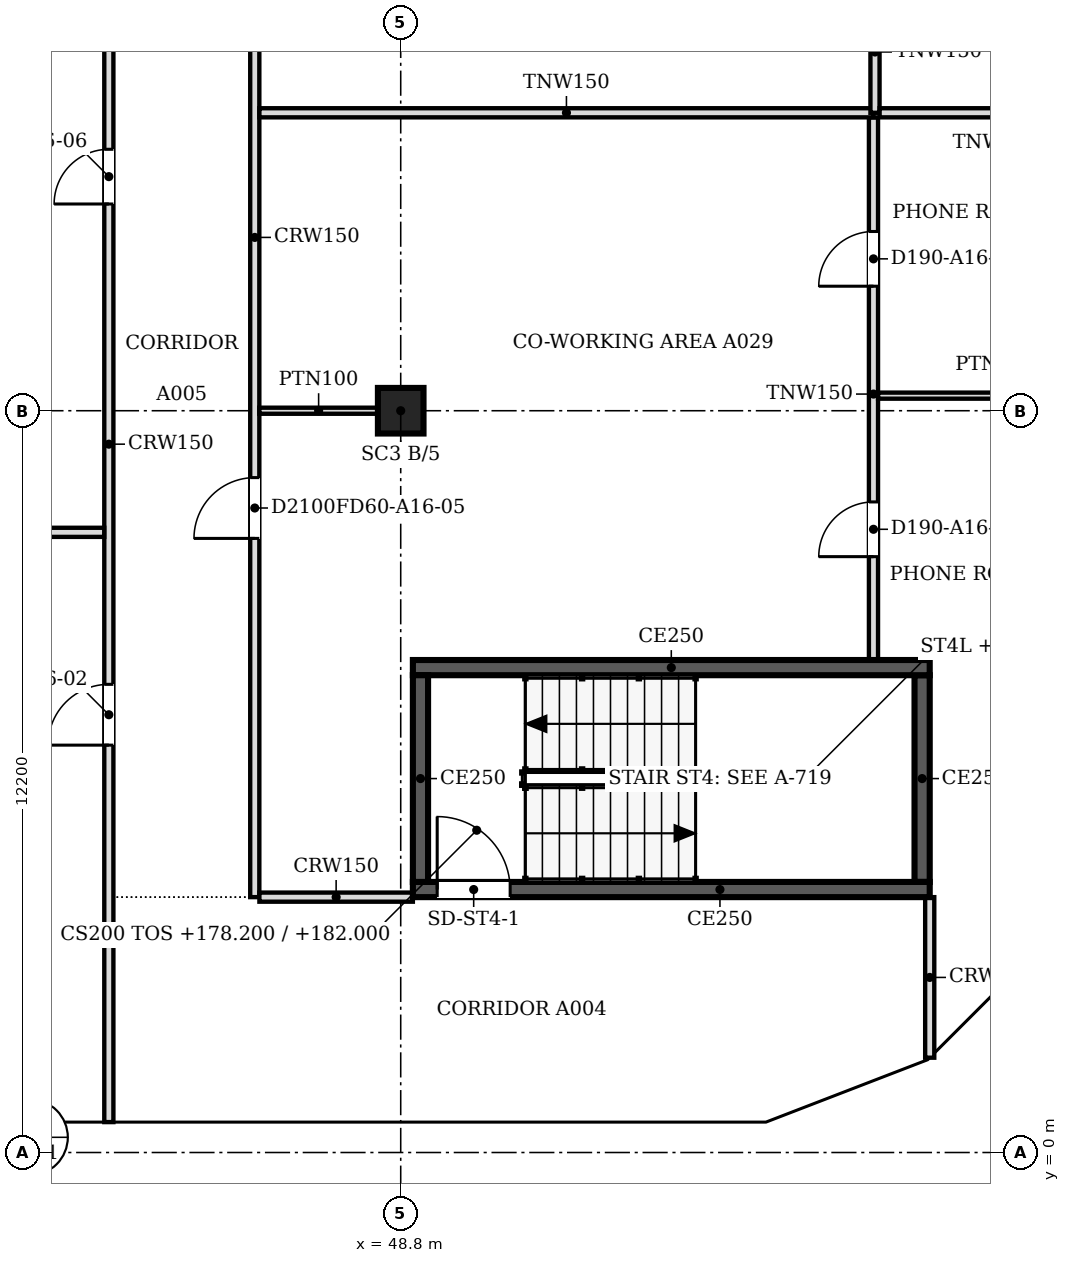
"""IFC4 building model, lengths in metres.
Left out: names, types, materials, properties, quantities, classifications, styles, units other than length and angle.
Written with IfcOpenShell. Run it as: python <this file> out.ifc"""

import sys

from ifc_helpers import new_model, si_unit, direction, frame, frame_2d, origin, origin_2d, place, context, subcontext, project, spatial, polyline, rectangle, outline, extrude, faceted_brep, source, transform, mapped, element, fill, save


model = new_model("IFC4")
c1 = context("Model", 3, precision=1e-05, world=origin(), true_north=direction((0.0, 1.0)))
c2 = subcontext(c1, "Body", "Model", "MODEL_VIEW")
j1 = project(units=[si_unit("LENGTHUNIT", "METRE"), si_unit("PLANEANGLEUNIT", "RADIAN")], contexts=[c1])
p1 = place(None, origin())
s1 = spatial("IfcSite", under=j1, at=p1, CompositionType="ELEMENT")
p2 = place(p1, origin())
s2 = spatial("IfcBuilding", under=s1, at=p2, CompositionType="ELEMENT")
p3 = place(p2, frame((0.0, 0.0, 178.2)))
s3 = spatial("IfcBuildingStorey", under=s2, at=p3, CompositionType="ELEMENT", Elevation=178.2)
p4 = place(p3, frame((48.8, 12.2, 0.0), z_axis=(0.0, 0.0, 1.0), x_axis=(1.0, 0.0, 0.0)))
e1 = element("IfcColumn", 1, at=p4, inside=s3, PredefinedType="COLUMN", context=c2, shape_type="SweptSolid", body=[
    extrude(rectangle(XDim=0.75, YDim=0.75, at=origin_2d()), origin(), (0.0, 0.0, 1.0), 3.6),
])
m1 = source(origin(), c2, "Body", "SweptSolid", [
    extrude(outline(polyline([(3.05, 0.0), (6.1, 3.8), (3.05, 7.6), (0.0, 3.8), (3.05, 0.0)])), frame((0.0, 0.25, 0.0), z_axis=(0.0, -1.0, 0.0), x_axis=(1.0, 0.0, 0.0)), (0.0, 0.0, 1.0), 0.5),
])
p5 = place(p3, frame((39.65, 0.25, -3.8), z_axis=(0.0, 0.0, 1.0), x_axis=(1.0, 0.0, 0.0)))
e2 = element("IfcWall", 2, at=p5, inside=s3, PredefinedType="SOLIDWALL", context=c2, shape_type="MappedRepresentation", body=[
    mapped(m1, transform((0.0, 0.0, 0.0), scale=1.0)),
])
m2 = source(origin(), c2, "Body", "SweptSolid", [
    extrude(outline(polyline([(3.05, 0.399), (5.78, 3.8), (3.05, 7.201), (0.321, 3.8), (3.05, 0.399)])), frame((0.0, 0.26, 0.0), z_axis=(0.0, -1.0, 0.0), x_axis=(1.0, 0.0, 0.0)), (0.0, 0.0, 1.0), 0.52),
])
p6 = place(p5, origin())
e3 = element("IfcOpeningElement", 3, at=p6, cuts=e2, PredefinedType="OPENING", context=c2, shape_type="MappedRepresentation", body=[
    mapped(m2, transform((0.0, 0.0, 0.0), scale=1.0)),
])
p7 = place(p3, frame((45.75, 0.25, -3.8), z_axis=(0.0, 0.0, 1.0), x_axis=(1.0, 0.0, 0.0)))
e4 = element("IfcWall", 4, at=p7, inside=s3, PredefinedType="SOLIDWALL", context=c2, shape_type="MappedRepresentation", body=[
    mapped(m1, transform((0.0, 0.0, 0.0), scale=1.0)),
])
p8 = place(p7, origin())
e5 = element("IfcOpeningElement", 5, at=p8, cuts=e4, PredefinedType="OPENING", context=c2, shape_type="MappedRepresentation", body=[
    mapped(m2, transform((0.0, 0.0, 0.0), scale=1.0)),
])
m3 = source(origin(), c2, "Body", "Brep", [
    faceted_brep([(3.003, -0.25, 0.0), (3.05, -0.25, 0.06), (3.05, -0.25, 7.54), (3.003, -0.25, 7.6), (0.0, -0.25, 3.8), (0.0, 0.25, 3.8), (2.957, 0.25, 7.541), (2.957, 0.25, 0.059), (3.003, 0.0, 0.0), (3.003, 0.0, 7.6)], [[[0, 1, 2, 3, 4]], [[5, 6, 7]], [[1, 0, 8]], [[9, 3, 2]], [[6, 5, 4, 3, 9]], [[5, 7, 8, 0, 4]], [[1, 8, 7, 6, 9, 2]]]),
])
p9 = place(p3, frame((51.85, 0.25, -3.8), z_axis=(0.0, 0.0, 1.0), x_axis=(1.0, 0.0, 0.0)))
e6 = element("IfcWall", 6, at=p9, inside=s3, PredefinedType="SOLIDWALL", context=c2, shape_type="MappedRepresentation", body=[
    mapped(m3, transform((0.0, 0.0, 0.0), scale=1.0)),
])
m4 = source(origin(), c2, "Body", "SweptSolid", [
    extrude(outline(polyline([(2.803, 6.944), (0.319, 3.8), (2.803, 0.656), (2.803, 6.944)])), frame((0.0, 0.26, 0.0), z_axis=(0.0, -1.0, 0.0), x_axis=(1.0, 0.0, 0.0)), (0.0, 0.0, 1.0), 0.52),
])
p10 = place(p9, origin())
e7 = element("IfcOpeningElement", 7, at=p10, cuts=e6, PredefinedType="OPENING", context=c2, shape_type="MappedRepresentation", body=[
    mapped(m4, transform((0.0, 0.0, 0.0), scale=1.0)),
])
m5 = source(origin(), c2, "Body", "Brep", [
    faceted_brep([(0.047, -0.25, 0.0), (2.997, -0.25, 3.8), (0.047, -0.25, 7.6), (0.0, -0.25, 7.541), (0.0, -0.25, 0.059), (0.093, 0.25, 7.54), (2.944, 0.25, 3.868), (2.944, 0.25, 3.732), (0.093, 0.25, 0.06), (2.997, 0.0, 3.8), (0.047, 0.0, 0.0), (0.047, 0.0, 7.6)], [[[0, 1, 2, 3, 4]], [[5, 6, 7, 8]], [[8, 7, 9, 1, 0, 10]], [[6, 5, 11, 2, 1, 9]], [[3, 2, 11]], [[10, 0, 4]], [[8, 10, 4, 3, 11, 5]], [[9, 7, 6]]]),
])
p11 = place(p3, frame((54.81, 0.233, -3.8), z_axis=(0.0, 0.0, 1.0), x_axis=(0.932990326376, 0.359901446078, 0.0)))
e8 = element("IfcWall", 8, at=p11, inside=s3, PredefinedType="SOLIDWALL", context=c2, shape_type="MappedRepresentation", body=[
    mapped(m5, transform((0.0, 0.0, 0.0), scale=1.0)),
])
m6 = source(origin(), c2, "Body", "SweptSolid", [
    extrude(outline(polyline([(0.247, 0.665), (2.681, 3.8), (0.247, 6.935), (0.247, 0.665)])), frame((0.0, 0.26, 0.0), z_axis=(0.0, -1.0, 0.0), x_axis=(1.0, 0.0, 0.0)), (0.0, 0.0, 1.0), 0.52),
])
p12 = place(p11, origin())
e9 = element("IfcOpeningElement", 9, at=p12, cuts=e8, PredefinedType="OPENING", context=c2, shape_type="MappedRepresentation", body=[
    mapped(m6, transform((0.0, 0.0, 0.0), scale=1.0)),
])
m7 = source(origin(), c2, "Body", "Brep", [
    faceted_brep([(2.944, -0.25, 0.0), (2.997, -0.25, 0.068), (2.997, -0.25, 7.532), (2.944, -0.25, 7.6), (0.0, -0.25, 3.8), (0.053, 0.25, 3.868), (2.891, 0.25, 7.532), (2.891, 0.25, 0.068), (0.053, 0.25, 3.732), (2.944, 0.0, 0.0), (2.944, 0.0, 7.6), (0.0, 0.0, 3.8)], [[[0, 1, 2, 3, 4]], [[5, 6, 7, 8]], [[1, 0, 9]], [[10, 3, 2]], [[6, 5, 11, 4, 3, 10]], [[8, 7, 9, 0, 4, 11]], [[8, 11, 5]], [[1, 9, 7, 6, 10, 2]]]),
])
p13 = place(p3, frame((57.606, 1.312, -3.8), z_axis=(0.0, 0.0, 1.0), x_axis=(0.707147509625, 0.707066050402, 0.0)))
e10 = element("IfcWall", 10, at=p13, inside=s3, PredefinedType="SOLIDWALL", context=c2, shape_type="MappedRepresentation", body=[
    mapped(m7, transform((0.0, 0.0, 0.0), scale=1.0)),
])
m8 = source(origin(), c2, "Body", "SweptSolid", [
    extrude(outline(polyline([(2.744, 6.934), (0.316, 3.8), (2.744, 0.667), (2.744, 6.934)])), frame((0.0, 0.26, 0.0), z_axis=(0.0, -1.0, 0.0), x_axis=(1.0, 0.0, 0.0)), (0.0, 0.0, 1.0), 0.52),
])
p14 = place(p13, origin())
e11 = element("IfcOpeningElement", 11, at=p14, cuts=e10, PredefinedType="OPENING", context=c2, shape_type="MappedRepresentation", body=[
    mapped(m8, transform((0.0, 0.0, 0.0), scale=1.0)),
])
p15 = place(p2, frame((0.0, 0.0, 182.0)))
s4 = spatial("IfcBuildingStorey", under=s2, at=p15, CompositionType="ELEMENT", Elevation=182.0)
p16 = place(p15, frame((42.7, 0.25, -3.8), z_axis=(0.0, 0.0, 1.0), x_axis=(1.0, 0.0, 0.0)))
e12 = element("IfcWall", 12, at=p16, inside=s4, PredefinedType="SOLIDWALL", context=c2, shape_type="MappedRepresentation", body=[
    mapped(m1, transform((0.0, 0.0, 0.0), scale=1.0)),
])
p17 = place(p16, origin())
e13 = element("IfcOpeningElement", 13, at=p17, cuts=e12, PredefinedType="OPENING", context=c2, shape_type="MappedRepresentation", body=[
    mapped(m2, transform((0.0, 0.0, 0.0), scale=1.0)),
])
m9 = source(origin(), c2, "Body", "Brep", [
    faceted_brep([(3.05, -0.25, 0.0), (6.053, -0.25, 3.8), (3.05, -0.25, 7.6), (0.0, -0.25, 3.8), (0.0, 0.25, 3.8), (3.05, 0.25, 7.6), (6.007, 0.25, 3.859), (6.007, 0.25, 3.741), (3.05, 0.25, 0.0), (6.053, 0.0, 3.8)], [[[0, 1, 2, 3]], [[4, 5, 6, 7, 8]], [[8, 7, 9, 1, 0]], [[6, 5, 2, 1, 9]], [[5, 4, 3, 2]], [[4, 8, 0, 3]], [[9, 7, 6]]]),
])
p18 = place(p15, frame((48.8, 0.25, -3.8), z_axis=(0.0, 0.0, 1.0), x_axis=(1.0, 0.0, 0.0)))
e14 = element("IfcWall", 14, at=p18, inside=s4, PredefinedType="SOLIDWALL", context=c2, shape_type="MappedRepresentation", body=[
    mapped(m9, transform((0.0, 0.0, 0.0), scale=1.0)),
])
m10 = source(origin(), c2, "Body", "SweptSolid", [
    extrude(outline(polyline([(3.049, 0.401), (5.735, 3.8), (3.049, 7.199), (0.321, 3.8), (3.049, 0.401)])), frame((0.0, 0.26, 0.0), z_axis=(0.0, -1.0, 0.0), x_axis=(1.0, 0.0, 0.0)), (0.0, 0.0, 1.0), 0.52),
])
p19 = place(p18, origin())
e15 = element("IfcOpeningElement", 15, at=p19, cuts=e14, PredefinedType="OPENING", context=c2, shape_type="MappedRepresentation", body=[
    mapped(m10, transform((0.0, 0.0, 0.0), scale=1.0)),
])
m11 = source(origin(), c2, "Body", "Brep", [
    faceted_brep([(2.95, -0.25, 0.0), (3.003, -0.25, 0.068), (3.003, -0.25, 7.532), (2.95, -0.25, 7.6), (0.0, -0.25, 3.8), (0.047, 0.25, 3.86), (2.898, 0.25, 7.532), (2.898, 0.25, 0.068), (0.047, 0.25, 3.74), (2.95, 0.0, 0.0), (2.95, 0.0, 7.6), (0.0, 0.0, 3.8)], [[[0, 1, 2, 3, 4]], [[5, 6, 7, 8]], [[1, 0, 9]], [[10, 3, 2]], [[6, 5, 11, 4, 3, 10]], [[8, 7, 9, 0, 4, 11]], [[8, 11, 5]], [[1, 9, 7, 6, 10, 2]]]),
])
p20 = place(p15, frame((54.854, 0.25, -3.8), z_axis=(0.0, 0.0, 1.0), x_axis=(0.932970071518, 0.359953949349, 0.0)))
e16 = element("IfcWall", 16, at=p20, inside=s4, PredefinedType="SOLIDWALL", context=c2, shape_type="MappedRepresentation", body=[
    mapped(m11, transform((0.0, 0.0, 0.0), scale=1.0)),
])
m12 = source(origin(), c2, "Body", "SweptSolid", [
    extrude(outline(polyline([(2.75, 6.935), (0.316, 3.8), (2.75, 0.665), (2.75, 6.935)])), frame((0.0, 0.26, 0.0), z_axis=(0.0, -1.0, 0.0), x_axis=(1.0, 0.0, 0.0)), (0.0, 0.0, 1.0), 0.52),
])
p21 = place(p20, origin())
e17 = element("IfcOpeningElement", 17, at=p21, cuts=e16, PredefinedType="OPENING", context=c2, shape_type="MappedRepresentation", body=[
    mapped(m12, transform((0.0, 0.0, 0.0), scale=1.0)),
])
m13 = source(origin(), c2, "Body", "Brep", [
    faceted_brep([(0.053, -0.25, 0.0), (2.997, -0.25, 3.8), (0.053, -0.25, 7.6), (0.0, -0.25, 7.532), (0.0, -0.25, 0.068), (0.106, 0.25, 7.532), (2.944, 0.25, 3.868), (2.944, 0.25, 3.732), (0.106, 0.25, 0.068), (2.997, 0.0, 3.8), (0.053, 0.0, 0.0), (0.053, 0.0, 7.6)], [[[0, 1, 2, 3, 4]], [[5, 6, 7, 8]], [[8, 7, 9, 1, 0, 10]], [[6, 5, 11, 2, 1, 9]], [[3, 2, 11]], [[10, 0, 4]], [[8, 10, 4, 3, 11, 5]], [[9, 7, 6]]]),
])
p22 = place(p15, frame((57.569, 1.274, -3.8), z_axis=(0.0, 0.0, 1.0), x_axis=(0.707066050402, 0.707147509625, 0.0)))
e18 = element("IfcWall", 18, at=p22, inside=s4, PredefinedType="SOLIDWALL", context=c2, shape_type="MappedRepresentation", body=[
    mapped(m13, transform((0.0, 0.0, 0.0), scale=1.0)),
])
m14 = source(origin(), c2, "Body", "SweptSolid", [
    extrude(outline(polyline([(0.253, 0.666), (2.681, 3.8), (0.253, 6.934), (0.253, 0.666)])), frame((0.0, 0.26, 0.0), z_axis=(0.0, -1.0, 0.0), x_axis=(1.0, 0.0, 0.0)), (0.0, 0.0, 1.0), 0.52),
])
p23 = place(p22, origin())
e19 = element("IfcOpeningElement", 19, at=p23, cuts=e18, PredefinedType="OPENING", context=c2, shape_type="MappedRepresentation", body=[
    mapped(m14, transform((0.0, 0.0, 0.0), scale=1.0)),
])
p24 = place(p3, frame((57.5, 4.325, 0.0), z_axis=(0.0, 0.0, 1.0), x_axis=(-1.0, 0.0, 0.0)))
e20 = element("IfcWall", 20, at=p24, inside=s3, PredefinedType="SOLIDWALL", context=c2, shape_type="SweptSolid", body=[
    extrude(rectangle(XDim=8.5, YDim=0.25, at=frame_2d((4.25, 0.0))), origin(), (0.0, 0.0, 1.0), 3.8),
])
m15 = source(origin(), c2, "Body", "SweptSolid", [
    extrude(rectangle(XDim=1.2, YDim=2.1, at=frame_2d((0.6, 1.05))), frame((0.0, 0.135, 0.0), z_axis=(0.0, -1.0, 0.0), x_axis=(1.0, 0.0, 0.0)), (0.0, 0.0, 1.0), 0.27),
])
p25 = place(p24, frame((6.9, 0.0, 0.0)))
e21 = element("IfcOpeningElement", 21, at=p25, cuts=e20, PredefinedType="OPENING", context=c2, shape_type="MappedRepresentation", body=[
    mapped(m15, transform((0.0, 0.0, 0.0), scale=1.0)),
])
p26 = place(p3, frame((49.125, 4.45, 0.0), z_axis=(0.0, 0.0, 1.0), x_axis=(0.0, 1.0, 0.0)))
e22 = element("IfcWall", 22, at=p26, inside=s3, PredefinedType="SOLIDWALL", context=c2, shape_type="SweptSolid", body=[
    extrude(rectangle(XDim=3.4, YDim=0.25, at=frame_2d((1.7, 0.0))), origin(), (0.0, 0.0, 1.0), 3.8),
])
p27 = place(p3, frame((49.0, 7.975, 0.0), z_axis=(0.0, 0.0, 1.0), x_axis=(1.0, 0.0, 0.0)))
e23 = element("IfcWall", 23, at=p27, inside=s3, PredefinedType="SOLIDWALL", context=c2, shape_type="SweptSolid", body=[
    extrude(rectangle(XDim=8.5, YDim=0.25, at=frame_2d((4.25, 0.0))), origin(), (0.0, 0.0, 1.0), 3.8),
])
p28 = place(p3, frame((57.375, 7.85, 0.0), z_axis=(0.0, 0.0, 1.0), x_axis=(0.0, -1.0, 0.0)))
e24 = element("IfcWall", 24, at=p28, inside=s3, PredefinedType="SOLIDWALL", context=c2, shape_type="SweptSolid", body=[
    extrude(rectangle(XDim=3.4, YDim=0.25, at=frame_2d((1.7, 0.0))), origin(), (0.0, 0.0, 1.0), 3.8),
])
p29 = place(p3, frame((44.0, 0.5, 0.0), z_axis=(0.0, 0.0, 1.0), x_axis=(0.0, 1.0, 0.0)))
e25 = element("IfcWall", 25, at=p29, inside=s3, PredefinedType="PARTITIONING", context=c2, shape_type="SweptSolid", body=[
    extrude(rectangle(XDim=21.424, YDim=0.15, at=frame_2d((10.712, 0.0))), origin(), (0.0, 0.0, 1.0), 3.067),
])
m16 = source(origin(), c2, "Body", "SweptSolid", [
    extrude(rectangle(XDim=1.0, YDim=2.1, at=frame_2d((0.5, 1.05))), frame((0.0, 0.085, 0.0), z_axis=(0.0, -1.0, 0.0), x_axis=(1.0, 0.0, 0.0)), (0.0, 0.0, 1.0), 0.17),
])
p30 = place(p29, frame((6.2, 0.0, 0.0)))
e26 = element("IfcOpeningElement", 26, at=p30, cuts=e25, PredefinedType="OPENING", context=c2, shape_type="MappedRepresentation", body=[
    mapped(m16, transform((0.0, 0.0, 0.0), scale=1.0)),
])
m17 = source(origin(), c2, "Body", "SweptSolid", [
    extrude(rectangle(XDim=0.9, YDim=2.1, at=frame_2d((0.45, 1.05))), frame((0.0, 0.085, 0.0), z_axis=(0.0, -1.0, 0.0), x_axis=(1.0, 0.0, 0.0)), (0.0, 0.0, 1.0), 0.17),
])
p31 = place(p29, frame((15.1, 0.0, 0.0)))
e27 = element("IfcOpeningElement", 27, at=p31, cuts=e25, PredefinedType="OPENING", context=c2, shape_type="MappedRepresentation", body=[
    mapped(m17, transform((0.0, 0.0, 0.0), scale=1.0)),
])
p32 = place(p3, frame((57.5, 1.559, 0.0), z_axis=(0.0, 0.0, 1.0), x_axis=(0.0, 1.0, 0.0)))
e28 = element("IfcWall", 28, at=p32, inside=s3, PredefinedType="PARTITIONING", context=c2, shape_type="SweptSolid", body=[
    extrude(rectangle(XDim=2.641, YDim=0.15, at=frame_2d((1.32, 0.0))), origin(), (0.0, 0.0, 1.0), 3.067),
])
p33 = place(p3, frame((46.4, 21.924, 0.0), z_axis=(0.0, 0.0, 1.0), x_axis=(0.0, -1.0, 0.0)))
e29 = element("IfcWall", 29, at=p33, inside=s3, PredefinedType="PARTITIONING", context=c2, shape_type="SweptSolid", body=[
    extrude(rectangle(XDim=17.724, YDim=0.15, at=frame_2d((8.862, 0.0))), origin(), (0.0, 0.0, 1.0), 3.067),
])
p34 = place(p33, frame((1.923, 0.0, 0.0)))
e30 = element("IfcOpeningElement", 30, at=p34, cuts=e29, PredefinedType="OPENING", context=c2, shape_type="MappedRepresentation", body=[
    mapped(m16, transform((0.0, 0.0, 0.0), scale=1.0)),
])
p35 = place(p33, frame((10.824, 0.0, 0.0)))
e31 = element("IfcOpeningElement", 31, at=p35, cuts=e29, PredefinedType="OPENING", context=c2, shape_type="MappedRepresentation", body=[
    mapped(m16, transform((0.0, 0.0, 0.0), scale=1.0)),
])
p36 = place(p3, frame((46.476, 4.2, 0.0), z_axis=(0.0, 0.0, 1.0), x_axis=(1.0, 0.0, 0.0)))
e32 = element("IfcWall", 32, at=p36, inside=s3, PredefinedType="PARTITIONING", context=c2, shape_type="SweptSolid", body=[
    extrude(rectangle(XDim=2.524, YDim=0.15, at=frame_2d((1.262, 0.0))), origin(), (0.0, 0.0, 1.0), 3.067),
])
p37 = place(p3, frame((56.575, 17.024, 0.0), z_axis=(0.0, 0.0, 1.0), x_axis=(0.0, -1.0, 0.0)))
e33 = element("IfcWall", 33, at=p37, inside=s3, PredefinedType="PARTITIONING", context=c2, shape_type="SweptSolid", body=[
    extrude(rectangle(XDim=8.924, YDim=0.15, at=frame_2d((4.462, 0.0))), origin(), (0.0, 0.0, 1.0), 3.067),
])
p38 = place(p37, frame((6.324, 0.0, 0.0)))
e34 = element("IfcOpeningElement", 34, at=p38, cuts=e33, PredefinedType="OPENING", context=c2, shape_type="MappedRepresentation", body=[
    mapped(m17, transform((0.0, 0.0, 0.0), scale=1.0)),
])
p39 = place(p37, frame((1.876, 0.0, 0.0)))
e35 = element("IfcOpeningElement", 35, at=p39, cuts=e33, PredefinedType="OPENING", context=c2, shape_type="MappedRepresentation", body=[
    mapped(m17, transform((0.0, 0.0, 0.0), scale=1.0)),
])
p40 = place(p3, frame((24.9, 10.2, 0.0), z_axis=(0.0, 0.0, 1.0), x_axis=(1.0, 0.0, 0.0)))
e36 = element("IfcWall", 36, at=p40, inside=s3, PredefinedType="PARTITIONING", context=c2, shape_type="SweptSolid", body=[
    extrude(rectangle(XDim=19.024, YDim=0.15, at=frame_2d((9.512, 0.0))), origin(), (0.0, 0.0, 1.0), 3.067),
])
p41 = place(p3, frame((48.425, 12.2, 0.0), z_axis=(0.0, 0.0, 1.0), x_axis=(-1.0, 0.0, 0.0)))
e37 = element("IfcWall", 37, at=p41, inside=s3, PredefinedType="PARTITIONING", context=c2, shape_type="SweptSolid", body=[
    extrude(rectangle(XDim=1.95, YDim=0.1, at=frame_2d((0.975, 0.0))), origin(), (0.0, 0.0, 1.0), 3.067),
])
p42 = place(p3, frame((56.651, 12.448, 0.0), z_axis=(0.0, 0.0, 1.0), x_axis=(1.0, 0.0, 0.0)))
e38 = element("IfcWall", 38, at=p42, inside=s3, PredefinedType="PARTITIONING", context=c2, shape_type="SweptSolid", body=[
    extrude(rectangle(XDim=3.849, YDim=0.1, at=frame_2d((1.925, 0.0))), origin(), (0.0, 0.0, 1.0), 3.067),
])
p43 = place(p3, frame((46.476, 17.1, 0.0), z_axis=(0.0, 0.0, 1.0), x_axis=(1.0, 0.0, 0.0)))
e39 = element("IfcWall", 39, at=p43, inside=s3, PredefinedType="PARTITIONING", context=c2, shape_type="SweptSolid", body=[
    extrude(rectangle(XDim=10.099, YDim=0.15, at=frame_2d((5.049, 0.0))), origin(), (0.0, 0.0, 1.0), 3.067),
])
p44 = place(p3, frame((56.6, 21.924, 0.0), z_axis=(0.0, 0.0, 1.0), x_axis=(0.0, -1.0, 0.0)))
e40 = element("IfcWall", 40, at=p44, inside=s3, PredefinedType="PARTITIONING", context=c2, shape_type="SweptSolid", body=[
    extrude(rectangle(XDim=4.824, YDim=0.15, at=frame_2d((2.412, 0.0))), origin(), (0.0, 0.0, 1.0), 3.067),
])
p45 = place(p44, frame((1.924, 0.0, 0.0)))
e41 = element("IfcOpeningElement", 41, at=p45, cuts=e40, PredefinedType="OPENING", context=c2, shape_type="MappedRepresentation", body=[
    mapped(m17, transform((0.0, 0.0, 0.0), scale=1.0)),
])
p46 = place(p3, frame((56.676, 17.1, 0.0), z_axis=(0.0, 0.0, 1.0), x_axis=(1.0, 0.0, 0.0)))
e42 = element("IfcWall", 42, at=p46, inside=s3, PredefinedType="PARTITIONING", context=c2, shape_type="SweptSolid", body=[
    extrude(rectangle(XDim=3.824, YDim=0.15, at=frame_2d((1.912, 0.0))), origin(), (0.0, 0.0, 1.0), 3.067),
])
m18 = source(origin(), c2, "Body", "SweptSolid", [
    extrude(rectangle(XDim=1.2, YDim=2.1, at=frame_2d((0.6, 1.05))), frame((0.0, 0.025, 0.0), z_axis=(0.0, -1.0, 0.0), x_axis=(1.0, 0.0, 0.0)), (0.0, 0.0, 1.0), 0.05),
])
p47 = place(p25, origin())
e43 = element("IfcDoor", 43, at=p47, inside=s3, OperationType="SINGLE_SWING_RIGHT", PredefinedType="DOOR", context=c2, shape_type="MappedRepresentation", body=[
    mapped(m18, transform((0.0, 0.0, 0.0), scale=1.0)),
])
fill(e21, e43)
m19 = source(origin(), c2, "Body", "SweptSolid", [
    extrude(rectangle(XDim=0.9, YDim=2.1, at=frame_2d((0.45, 1.05))), frame((0.0, 0.025, 0.0), z_axis=(0.0, -1.0, 0.0), x_axis=(1.0, 0.0, 0.0)), (0.0, 0.0, 1.0), 0.05),
])
p48 = place(p38, origin())
e44 = element("IfcDoor", 44, at=p48, inside=s3, OperationType="SINGLE_SWING_RIGHT", PredefinedType="DOOR", context=c2, shape_type="MappedRepresentation", body=[
    mapped(m19, transform((0.0, 0.0, 0.0), scale=1.0)),
])
fill(e34, e44)
p49 = place(p39, origin())
e45 = element("IfcDoor", 45, at=p49, inside=s3, OperationType="SINGLE_SWING_RIGHT", PredefinedType="DOOR", context=c2, shape_type="MappedRepresentation", body=[
    mapped(m19, transform((0.0, 0.0, 0.0), scale=1.0)),
])
fill(e35, e45)
m20 = source(origin(), c2, "Body", "SweptSolid", [
    extrude(rectangle(XDim=1.0, YDim=2.1, at=frame_2d((0.5, 1.05))), frame((0.0, 0.025, 0.0), z_axis=(0.0, -1.0, 0.0), x_axis=(1.0, 0.0, 0.0)), (0.0, 0.0, 1.0), 0.05),
])
p50 = place(p30, origin())
e46 = element("IfcDoor", 46, at=p50, inside=s3, OperationType="SINGLE_SWING_LEFT", PredefinedType="DOOR", context=c2, shape_type="MappedRepresentation", body=[
    mapped(m20, transform((0.0, 0.0, 0.0), scale=1.0)),
])
fill(e26, e46)
p51 = place(p31, origin())
e47 = element("IfcDoor", 47, at=p51, inside=s3, OperationType="SINGLE_SWING_LEFT", PredefinedType="DOOR", context=c2, shape_type="MappedRepresentation", body=[
    mapped(m19, transform((0.0, 0.0, 0.0), scale=1.0)),
])
fill(e27, e47)
p52 = place(p35, origin())
e48 = element("IfcDoor", 48, at=p52, inside=s3, OperationType="SINGLE_SWING_RIGHT", PredefinedType="DOOR", context=c2, shape_type="MappedRepresentation", body=[
    mapped(m20, transform((0.0, 0.0, 0.0), scale=1.0)),
])
fill(e31, e48)
save(model, sys.argv[1])
